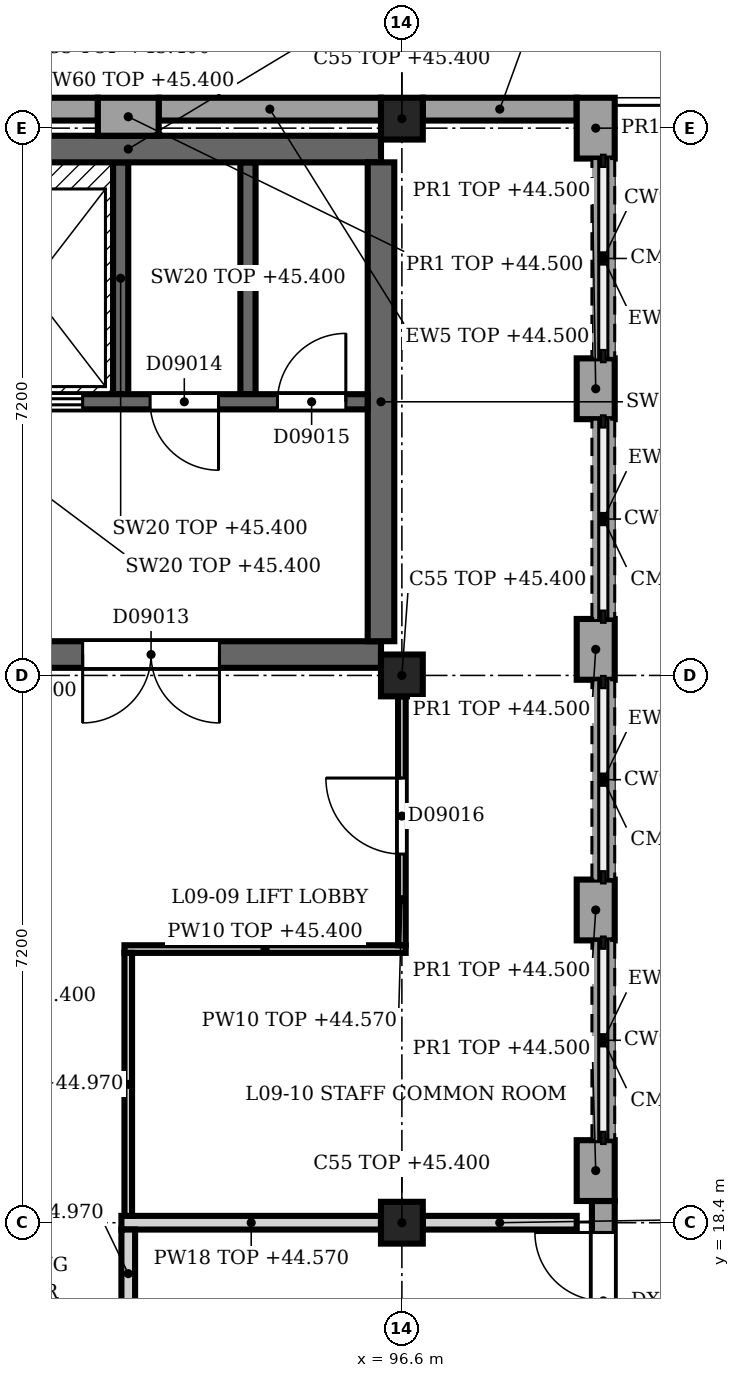
"""IFC4 building model, lengths in metres.
Left out: names, types, materials, properties, quantities, classifications, styles, units other than length and angle.
Written with IfcOpenShell. Run it as: python <this file> out.ifc"""

import sys

from ifc_helpers import new_model, si_unit, direction, frame, frame_2d, origin, origin_2d, place, context, subcontext, project, spatial, rectangle, extrude, element, fill, save


model = new_model("IFC4")
c1 = context("Model", 3, precision=1e-05, world=origin(), true_north=direction((0.0, 1.0)))
c2 = subcontext(c1, "Body", "Model", "MODEL_VIEW")
j1 = project(units=[si_unit("LENGTHUNIT", "METRE"), si_unit("PLANEANGLEUNIT", "RADIAN")], contexts=[c1])
p1 = place(None, origin())
s1 = spatial("IfcSite", under=j1, at=p1, CompositionType="ELEMENT")
p2 = place(p1, origin())
s2 = spatial("IfcBuilding", under=s1, at=p2, CompositionType="ELEMENT")
p3 = place(p2, frame((0.0, 0.0, 41.4)))
s3 = spatial("IfcBuildingStorey", under=s2, at=p3, CompositionType="ELEMENT", Elevation=41.4)
for number, where, z_axis, x_axis in (
    (1, (96.6, 18.4, 0.0), (0.0, 0.0, 1.0), (1.0, 0.0, 0.0)),
    (2, (96.6, 25.6, 0.0), (0.0, 0.0, 1.0), (1.0, 0.0, 0.0)),
    (3, (96.6, 32.925, 0.0), (0.0, 0.0, 1.0), (1.0, 0.0, 0.0)),
):
    element("IfcColumn", number, at=place(p3, frame(where, z_axis=z_axis, x_axis=x_axis)), inside=s3, PredefinedType="COLUMN", context=c2, shape_type="SweptSolid", body=[
        extrude(rectangle(XDim=0.55, YDim=0.55, at=origin_2d()), origin(), (0.0, 0.0, 1.0), 4.0),
    ])
p4 = place(p3, frame((92.6, 32.95, 0.0), z_axis=(0.0, 0.0, 1.0), x_axis=(1.0, 0.0, 0.0)))
e4 = element("IfcWall", 4, at=p4, inside=s3, PredefinedType="SOLIDWALL", context=c2, shape_type="SweptSolid", body=[
    extrude(rectangle(XDim=0.8, YDim=0.5, at=frame_2d((0.4, 0.0))), origin(), (0.0, 0.0, 1.0), 3.1),
])
for number, where, z_axis, x_axis in (
    (5, (89.675, 33.05, 0.0), (0.0, 0.0, 1.0), (1.0, 0.0, 0.0)),
    (6, (93.4, 33.05, 0.0), (0.0, 0.0, 1.0), (1.0, 0.0, 0.0)),
):
    element("IfcWall", number, at=place(p3, frame(where, z_axis=z_axis, x_axis=x_axis)), inside=s3, PredefinedType="SOLIDWALL", context=c2, shape_type="SweptSolid", body=[
        extrude(rectangle(XDim=2.925, YDim=0.3, at=frame_2d((1.462, 0.0))), origin(), (0.0, 0.0, 1.0), 3.1),
    ])
p5 = place(p3, frame((96.875, 33.05, 0.0), z_axis=(0.0, 0.0, 1.0), x_axis=(1.0, 0.0, 0.0)))
e7 = element("IfcWall", 7, at=p5, inside=s3, PredefinedType="SOLIDWALL", context=c2, shape_type="SweptSolid", body=[
    extrude(rectangle(XDim=2.025, YDim=0.3, at=frame_2d((1.012, 0.0))), origin(), (0.0, 0.0, 1.0), 3.1),
])
for number, where, z_axis, x_axis in (
    (8, (99.15, 33.2, 0.0), (0.0, 0.0, 1.0), (0.0, -1.0, 0.0)),
    (9, (99.15, 29.771, 0.0), (0.0, 0.0, 1.0), (0.0, -1.0, 0.0)),
    (10, (99.15, 26.343, 0.0), (0.0, 0.0, 1.0), (0.0, -1.0, 0.0)),
    (11, (99.15, 22.914, 0.0), (0.0, 0.0, 1.0), (0.0, -1.0, 0.0)),
):
    element("IfcWall", number, at=place(p3, frame(where, z_axis=z_axis, x_axis=x_axis)), inside=s3, PredefinedType="SOLIDWALL", context=c2, shape_type="SweptSolid", body=[
        extrude(rectangle(XDim=0.8, YDim=0.5, at=frame_2d((0.4, 0.0))), origin(), (0.0, 0.0, 1.0), 3.1),
    ])
p6 = place(p3, frame((99.15, 19.486, 0.0), z_axis=(0.0, 0.0, 1.0), x_axis=(0.0, -1.0, 0.0)))
e12 = element("IfcWall", 12, at=p6, inside=s3, PredefinedType="SOLIDWALL", context=c2, shape_type="SweptSolid", body=[
    extrude(rectangle(XDim=0.8, YDim=0.5, at=frame_2d((0.4, 0.0))), origin(), (0.0, 0.0, 1.0), 3.1),
])
for number, where, z_axis, x_axis in (
    (13, (99.25, 32.4, 0.0), (0.0, 0.0, 1.0), (0.0, -1.0, 0.0)),
    (14, (99.25, 28.971, 0.0), (0.0, 0.0, 1.0), (0.0, -1.0, 0.0)),
):
    element("IfcWall", number, at=place(p3, frame(where, z_axis=z_axis, x_axis=x_axis)), inside=s3, PredefinedType="SOLIDWALL", context=c2, shape_type="SweptSolid", body=[
        extrude(rectangle(XDim=2.628, YDim=0.3, at=frame_2d((1.314, 0.0))), origin(), (0.0, 0.0, 1.0), 0.45),
    ])
for number, where, z_axis, x_axis in (
    (15, (99.25, 25.543, 0.0), (0.0, 0.0, 1.0), (0.0, -1.0, 0.0)),
    (16, (99.25, 22.114, 0.0), (0.0, 0.0, 1.0), (0.0, -1.0, 0.0)),
):
    element("IfcWall", number, at=place(p3, frame(where, z_axis=z_axis, x_axis=x_axis)), inside=s3, PredefinedType="SOLIDWALL", context=c2, shape_type="SweptSolid", body=[
        extrude(rectangle(XDim=2.629, YDim=0.3, at=frame_2d((1.314, 0.0))), origin(), (0.0, 0.0, 1.0), 0.45),
    ])
p7 = place(p3, frame((99.25, 18.686, 0.0), z_axis=(0.0, 0.0, 1.0), x_axis=(0.0, -1.0, 0.0)))
e17 = element("IfcWall", 17, at=p7, inside=s3, PredefinedType="SOLIDWALL", context=c2, shape_type="SweptSolid", body=[
    extrude(rectangle(XDim=2.629, YDim=0.3, at=frame_2d((1.314, 0.0))), origin(), (0.0, 0.0, 1.0), 3.1),
])
p8 = place(p7, frame((0.414, 0.0, 0.0)))
e18 = element("IfcOpeningElement", 18, at=p8, cuts=e17, PredefinedType="OPENING", context=c2, shape_type="SweptSolid", body=[
    extrude(rectangle(XDim=1.8, YDim=2.4, at=frame_2d((0.9, 1.2))), frame((0.0, 0.16, 0.0), z_axis=(0.0, -1.0, 0.0), x_axis=(1.0, 0.0, 0.0)), (0.0, 0.0, 1.0), 0.32),
])
p9 = place(p3, frame((89.675, 25.875, 0.0), z_axis=(0.0, 0.0, 1.0), x_axis=(1.0, 0.0, 0.0)))
e19 = element("IfcWall", 19, at=p9, inside=s3, PredefinedType="SHEAR", context=c2, shape_type="SweptSolid", body=[
    extrude(rectangle(XDim=6.65, YDim=0.35, at=frame_2d((3.325, 0.0))), origin(), (0.0, 0.0, 1.0), 4.0),
])
p10 = place(p9, frame((2.725, 0.0, 0.0)))
e20 = element("IfcOpeningElement", 20, at=p10, cuts=e19, PredefinedType="OPENING", context=c2, shape_type="SweptSolid", body=[
    extrude(rectangle(XDim=1.8, YDim=2.1, at=frame_2d((0.9, 1.05))), frame((0.0, 0.185, 0.0), z_axis=(0.0, -1.0, 0.0), x_axis=(1.0, 0.0, 0.0)), (0.0, 0.0, 1.0), 0.37),
])
p11 = place(p3, frame((89.675, 32.525, 0.0), z_axis=(0.0, 0.0, 1.0), x_axis=(1.0, 0.0, 0.0)))
e21 = element("IfcWall", 21, at=p11, inside=s3, PredefinedType="SHEAR", context=c2, shape_type="SweptSolid", body=[
    extrude(rectangle(XDim=6.65, YDim=0.35, at=frame_2d((3.325, 0.0))), origin(), (0.0, 0.0, 1.0), 4.0),
])
p12 = place(p3, frame((96.325, 26.05, 0.0), z_axis=(0.0, 0.0, 1.0), x_axis=(0.0, 1.0, 0.0)))
e22 = element("IfcWall", 22, at=p12, inside=s3, PredefinedType="SHEAR", context=c2, shape_type="SweptSolid", body=[
    extrude(rectangle(XDim=6.3, YDim=0.35, at=frame_2d((3.15, 0.0))), origin(), (0.0, 0.0, 1.0), 4.0),
])
p13 = place(p3, frame((96.15, 29.2, 0.0), z_axis=(0.0, 0.0, 1.0), x_axis=(-1.0, 0.0, 0.0)))
e23 = element("IfcWall", 23, at=p13, inside=s3, PredefinedType="SHEAR", context=c2, shape_type="SweptSolid", body=[
    extrude(rectangle(XDim=10.35, YDim=0.2, at=frame_2d((5.175, 0.0))), origin(), (0.0, 0.0, 1.0), 4.0),
])
p14 = place(p13, frame((8.8, 0.0, 0.0)))
e24 = element("IfcOpeningElement", 24, at=p14, cuts=e23, PredefinedType="OPENING", context=c2, shape_type="SweptSolid", body=[
    extrude(rectangle(XDim=1.1, YDim=2.1, at=frame_2d((0.55, 1.05))), frame((0.0, 0.11, 0.0), z_axis=(0.0, -1.0, 0.0), x_axis=(1.0, 0.0, 0.0)), (0.0, 0.0, 1.0), 0.22),
])
p15 = place(p13, frame((6.6, 0.0, 0.0)))
e25 = element("IfcOpeningElement", 25, at=p15, cuts=e23, PredefinedType="OPENING", context=c2, shape_type="SweptSolid", body=[
    extrude(rectangle(XDim=1.1, YDim=2.1, at=frame_2d((0.55, 1.05))), frame((0.0, 0.11, 0.0), z_axis=(0.0, -1.0, 0.0), x_axis=(1.0, 0.0, 0.0)), (0.0, 0.0, 1.0), 0.22),
])
p16 = place(p13, frame((3.75, 0.0, 0.0)))
e26 = element("IfcOpeningElement", 26, at=p16, cuts=e23, PredefinedType="OPENING", context=c2, shape_type="SweptSolid", body=[
    extrude(rectangle(XDim=1.4, YDim=2.1, at=frame_2d((0.7, 1.05))), frame((0.0, 0.11, 0.0), z_axis=(0.0, -1.0, 0.0), x_axis=(1.0, 0.0, 0.0)), (0.0, 0.0, 1.0), 0.22),
])
p17 = place(p13, frame((1.962, 0.0, 0.0)))
e27 = element("IfcOpeningElement", 27, at=p17, cuts=e23, PredefinedType="OPENING", context=c2, shape_type="SweptSolid", body=[
    extrude(rectangle(XDim=0.9, YDim=2.1, at=frame_2d((0.45, 1.05))), frame((0.0, 0.11, 0.0), z_axis=(0.0, -1.0, 0.0), x_axis=(1.0, 0.0, 0.0)), (0.0, 0.0, 1.0), 0.22),
])
p18 = place(p13, frame((0.288, 0.0, 0.0)))
e28 = element("IfcOpeningElement", 28, at=p18, cuts=e23, PredefinedType="OPENING", context=c2, shape_type="SweptSolid", body=[
    extrude(rectangle(XDim=0.9, YDim=2.1, at=frame_2d((0.45, 1.05))), frame((0.0, 0.11, 0.0), z_axis=(0.0, -1.0, 0.0), x_axis=(1.0, 0.0, 0.0)), (0.0, 0.0, 1.0), 0.22),
])
for number, where, z_axis, x_axis in (
    (29, (92.9, 29.3, 0.0), (0.0, 0.0, 1.0), (0.0, 1.0, 0.0)),
    (30, (94.575, 29.3, 0.0), (0.0, 0.0, 1.0), (0.0, 1.0, 0.0)),
):
    element("IfcWall", number, at=place(p3, frame(where, z_axis=z_axis, x_axis=x_axis)), inside=s3, PredefinedType="SHEAR", context=c2, shape_type="SweptSolid", body=[
        extrude(rectangle(XDim=3.05, YDim=0.2, at=frame_2d((1.525, 0.0))), origin(), (0.0, 0.0, 1.0), 4.0),
    ])
p19 = place(p3, frame((92.91, 18.4, 0.0), z_axis=(0.0, 0.0, 1.0), x_axis=(1.0, 0.0, 0.0)))
e31 = element("IfcWall", 31, at=p19, inside=s3, PredefinedType="PARTITIONING", context=c2, shape_type="SweptSolid", body=[
    extrude(rectangle(XDim=3.415, YDim=0.18, at=frame_2d((1.708, 0.0))), origin(), (0.0, 0.0, 1.0), 3.17),
])
p20 = place(p3, frame((96.875, 18.4, 0.0), z_axis=(0.0, 0.0, 1.0), x_axis=(1.0, 0.0, 0.0)))
e32 = element("IfcWall", 32, at=p20, inside=s3, PredefinedType="PARTITIONING", context=c2, shape_type="SweptSolid", body=[
    extrude(rectangle(XDim=2.025, YDim=0.18, at=frame_2d((1.012, 0.0))), origin(), (0.0, 0.0, 1.0), 3.17),
])
p21 = place(p3, frame((92.95, 22.0, 0.0), z_axis=(0.0, 0.0, 1.0), x_axis=(1.0, 0.0, 0.0)))
e33 = element("IfcWall", 33, at=p21, inside=s3, PredefinedType="PARTITIONING", context=c2, shape_type="SweptSolid", body=[
    extrude(rectangle(XDim=3.7, YDim=0.1, at=frame_2d((1.85, 0.0))), origin(), (0.0, 0.0, 1.0), 4.0),
])
p22 = place(p3, frame((93.0, 18.31, 0.0), z_axis=(0.0, 0.0, 1.0), x_axis=(0.0, -1.0, 0.0)))
e34 = element("IfcWall", 34, at=p22, inside=s3, PredefinedType="PARTITIONING", context=c2, shape_type="SweptSolid", body=[
    extrude(rectangle(XDim=3.42, YDim=0.18, at=frame_2d((1.71, 0.0))), origin(), (0.0, 0.0, 1.0), 3.57),
])
p23 = place(p22, frame((1.16, 0.0, 0.0)))
e35 = element("IfcOpeningElement", 35, at=p23, cuts=e34, PredefinedType="OPENING", context=c2, shape_type="SweptSolid", body=[
    extrude(rectangle(XDim=1.1, YDim=2.1, at=frame_2d((0.55, 1.05))), frame((0.0, 0.1, 0.0), z_axis=(0.0, -1.0, 0.0), x_axis=(1.0, 0.0, 0.0)), (0.0, 0.0, 1.0), 0.2),
])
p24 = place(p3, frame((93.0, 18.49, 0.0), z_axis=(0.0, 0.0, 1.0), x_axis=(0.0, 1.0, 0.0)))
e36 = element("IfcWall", 36, at=p24, inside=s3, PredefinedType="PARTITIONING", context=c2, shape_type="SweptSolid", body=[
    extrude(rectangle(XDim=3.46, YDim=0.1, at=frame_2d((1.73, 0.0))), origin(), (0.0, 0.0, 1.0), 3.57),
])
p25 = place(p3, frame((96.6, 25.325, 0.0), z_axis=(0.0, 0.0, 1.0), x_axis=(0.0, -1.0, 0.0)))
e37 = element("IfcWall", 37, at=p25, inside=s3, PredefinedType="PARTITIONING", context=c2, shape_type="SweptSolid", body=[
    extrude(rectangle(XDim=3.275, YDim=0.1, at=frame_2d((1.637, 0.0))), origin(), (0.0, 0.0, 1.0), 3.17),
])
p26 = place(p25, frame((1.075, 0.0, 0.0)))
e38 = element("IfcOpeningElement", 38, at=p26, cuts=e37, PredefinedType="OPENING", context=c2, shape_type="SweptSolid", body=[
    extrude(rectangle(XDim=1.0, YDim=2.1, at=frame_2d((0.5, 1.05))), frame((0.0, 0.06, 0.0), z_axis=(0.0, -1.0, 0.0), x_axis=(1.0, 0.0, 0.0)), (0.0, 0.0, 1.0), 0.12),
])
p27 = place(p8, origin())
e39 = element("IfcDoor", 39, at=p27, inside=s3, OperationType="SINGLE_SWING_LEFT", PredefinedType="DOOR", context=c2, shape_type="SweptSolid", body=[
    extrude(rectangle(XDim=1.8, YDim=2.4, at=frame_2d((0.9, 1.2))), frame((0.0, 0.025, 0.0), z_axis=(0.0, -1.0, 0.0), x_axis=(1.0, 0.0, 0.0)), (0.0, 0.0, 1.0), 0.05),
])
fill(e18, e39)
p28 = place(p10, origin())
e40 = element("IfcDoor", 40, at=p28, inside=s3, OperationType="SINGLE_SWING_LEFT", PredefinedType="DOOR", context=c2, shape_type="SweptSolid", body=[
    extrude(rectangle(XDim=1.8, YDim=2.1, at=frame_2d((0.9, 1.05))), frame((0.0, 0.025, 0.0), z_axis=(0.0, -1.0, 0.0), x_axis=(1.0, 0.0, 0.0)), (0.0, 0.0, 1.0), 0.05),
])
fill(e20, e40)
p29 = place(p16, origin())
e41 = element("IfcDoor", 41, at=p29, inside=s3, OperationType="DOUBLE_DOOR_SLIDING", PredefinedType="DOOR", context=c2, shape_type="SweptSolid", body=[
    extrude(rectangle(XDim=1.4, YDim=2.1, at=frame_2d((0.7, 1.05))), frame((0.0, 0.025, 0.0), z_axis=(0.0, -1.0, 0.0), x_axis=(1.0, 0.0, 0.0)), (0.0, 0.0, 1.0), 0.05),
])
fill(e26, e41)
p30 = place(p17, origin())
e42 = element("IfcDoor", 42, at=p30, inside=s3, OperationType="SINGLE_SWING_LEFT", PredefinedType="DOOR", context=c2, shape_type="SweptSolid", body=[
    extrude(rectangle(XDim=0.9, YDim=2.1, at=frame_2d((0.45, 1.05))), frame((0.0, 0.025, 0.0), z_axis=(0.0, -1.0, 0.0), x_axis=(1.0, 0.0, 0.0)), (0.0, 0.0, 1.0), 0.05),
])
fill(e27, e42)
p31 = place(p18, origin())
e43 = element("IfcDoor", 43, at=p31, inside=s3, OperationType="SINGLE_SWING_LEFT", PredefinedType="DOOR", context=c2, shape_type="SweptSolid", body=[
    extrude(rectangle(XDim=0.9, YDim=2.1, at=frame_2d((0.45, 1.05))), frame((0.0, 0.025, 0.0), z_axis=(0.0, -1.0, 0.0), x_axis=(1.0, 0.0, 0.0)), (0.0, 0.0, 1.0), 0.05),
])
fill(e28, e43)
p32 = place(p26, origin())
e44 = element("IfcDoor", 44, at=p32, inside=s3, OperationType="SINGLE_SWING_LEFT", PredefinedType="DOOR", context=c2, shape_type="SweptSolid", body=[
    extrude(rectangle(XDim=1.0, YDim=2.1, at=frame_2d((0.5, 1.05))), frame((0.0, 0.025, 0.0), z_axis=(0.0, -1.0, 0.0), x_axis=(1.0, 0.0, 0.0)), (0.0, 0.0, 1.0), 0.05),
])
fill(e38, e44)
save(model, sys.argv[1])
